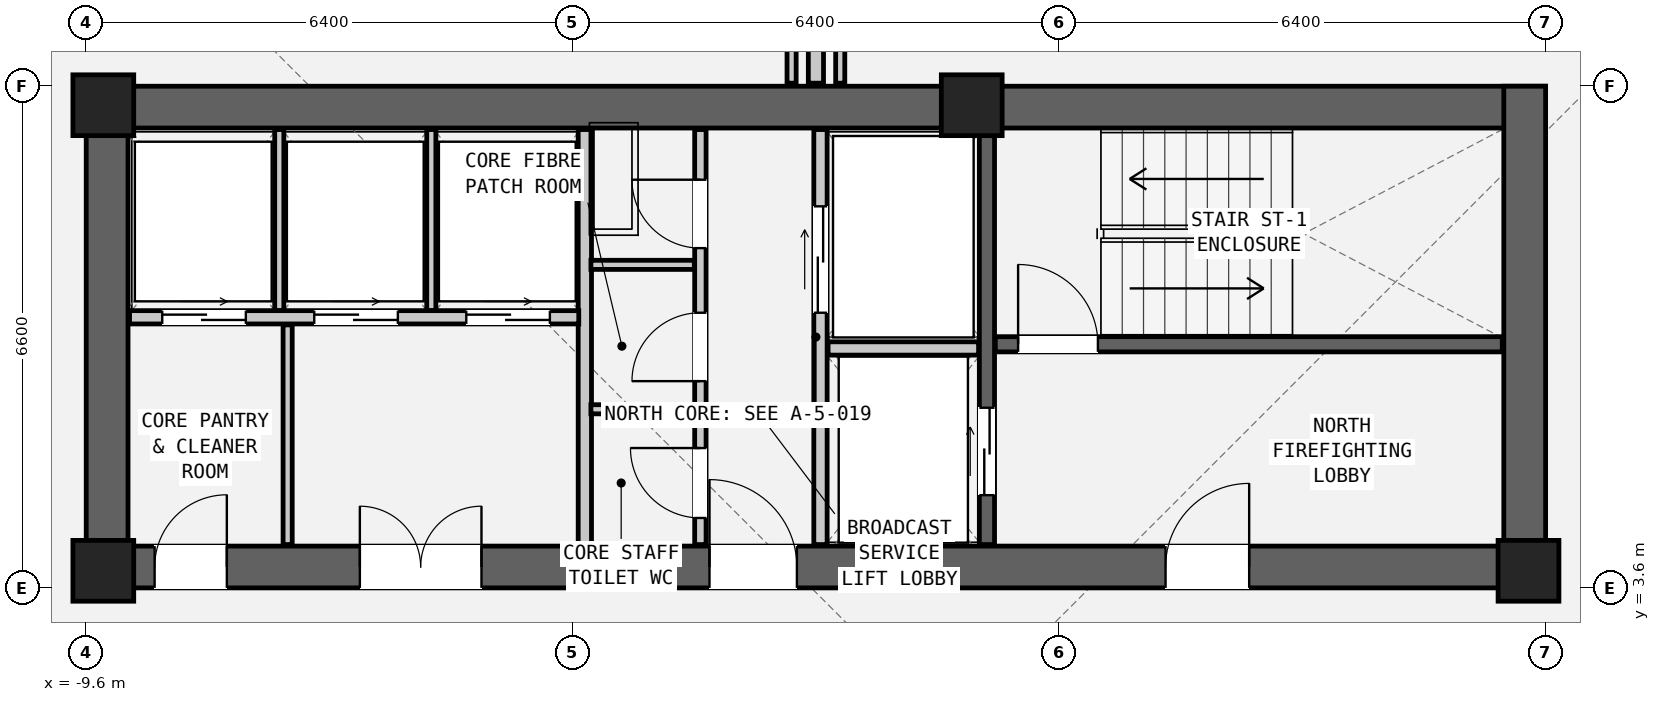
"""IFC4 building model, lengths in metres.
Left out: names, types, materials, properties, quantities, classifications, styles, units other than length and angle.
Written with IfcOpenShell. Run it as: python <this file> out.ifc"""

import sys

from ifc_helpers import new_model, si_unit, direction, frame, frame_2d, origin, origin_2d, place, context, subcontext, project, spatial, rectangle, extrude, element, fill, save


model = new_model("IFC4")
c1 = context("Model", 3, precision=1e-05, world=origin(), true_north=direction((0.0, 1.0)))
c2 = subcontext(c1, "Body", "Model", "MODEL_VIEW")
j1 = project(units=[si_unit("LENGTHUNIT", "METRE"), si_unit("PLANEANGLEUNIT", "RADIAN")], contexts=[c1])
p1 = place(None, origin())
s1 = spatial("IfcSite", under=j1, at=p1, CompositionType="ELEMENT")
p2 = place(p1, origin())
s2 = spatial("IfcBuilding", under=s1, at=p2, CompositionType="ELEMENT")
p3 = place(p2, frame((0.0, 0.0, 57.9)))
s3 = spatial("IfcBuildingStorey", under=s2, at=p3, CompositionType="ELEMENT", Elevation=57.9)
p4 = place(p3, frame((-9.6, 9.925, 0.0), z_axis=(0.0, 0.0, 1.0), x_axis=(1.0, 0.0, 0.0)))
e1 = element("IfcWall", 1, at=p4, inside=s3, PredefinedType="SHEAR", context=c2, shape_type="SweptSolid", body=[
    extrude(rectangle(XDim=19.2, YDim=0.55, at=frame_2d((9.6, 0.0))), origin(), (0.0, 0.0, 1.0), 3.6),
])
p5 = place(p3, frame((-9.6, 3.875, 0.0), z_axis=(0.0, 0.0, 1.0), x_axis=(1.0, 0.0, 0.0)))
e2 = element("IfcWall", 2, at=p5, inside=s3, PredefinedType="SHEAR", context=c2, shape_type="SweptSolid", body=[
    extrude(rectangle(XDim=19.2, YDim=0.55, at=frame_2d((9.6, 0.0))), origin(), (0.0, 0.0, 1.0), 3.6),
])
p6 = place(p5, frame((14.2, 0.0, 0.0)))
e3 = element("IfcOpeningElement", 3, at=p6, cuts=e2, PredefinedType="OPENING", context=c2, shape_type="SweptSolid", body=[
    extrude(rectangle(XDim=1.1, YDim=2.08, at=frame_2d((0.55, 1.04))), frame((0.0, 0.287, 0.0), z_axis=(0.0, -1.0, 0.0), x_axis=(1.0, 0.0, 0.0)), (0.0, 0.0, 1.0), 0.574),
])
p7 = place(p5, frame((8.2, 0.0, 0.0)))
e4 = element("IfcOpeningElement", 4, at=p7, cuts=e2, PredefinedType="OPENING", context=c2, shape_type="SweptSolid", body=[
    extrude(rectangle(XDim=1.15, YDim=2.1, at=frame_2d((0.575, 1.05))), frame((0.0, 0.287, 0.0), z_axis=(0.0, -1.0, 0.0), x_axis=(1.0, 0.0, 0.0)), (0.0, 0.0, 1.0), 0.574),
])
p8 = place(p5, frame((0.9, 0.0, 0.0)))
e5 = element("IfcOpeningElement", 5, at=p8, cuts=e2, PredefinedType="OPENING", context=c2, shape_type="SweptSolid", body=[
    extrude(rectangle(XDim=0.95, YDim=2.1, at=frame_2d((0.475, 1.05))), frame((0.0, 0.287, 0.0), z_axis=(0.0, -1.0, 0.0), x_axis=(1.0, 0.0, 0.0)), (0.0, 0.0, 1.0), 0.574),
])
p9 = place(p5, frame((3.6, 0.0, 0.0)))
e6 = element("IfcOpeningElement", 6, at=p9, cuts=e2, PredefinedType="OPENING", context=c2, shape_type="SweptSolid", body=[
    extrude(rectangle(XDim=1.6, YDim=2.12, at=frame_2d((0.8, 1.06))), frame((0.0, 0.287, 0.0), z_axis=(0.0, -1.0, 0.0), x_axis=(1.0, 0.0, 0.0)), (0.0, 0.0, 1.0), 0.574),
])
for number, where, z_axis, x_axis in (
    (7, (-9.325, 3.6, 0.0), (0.0, 0.0, 1.0), (0.0, 1.0, 0.0)),
    (8, (9.325, 3.6, 0.0), (0.0, 0.0, 1.0), (0.0, 1.0, 0.0)),
):
    element("IfcWall", number, at=place(p3, frame(where, z_axis=z_axis, x_axis=x_axis)), inside=s3, PredefinedType="SHEAR", context=c2, shape_type="SweptSolid", body=[
        extrude(rectangle(XDim=6.6, YDim=0.55, at=frame_2d((3.3, 0.0))), origin(), (0.0, 0.0, 1.0), 3.6),
    ])
for number, where, z_axis, x_axis in (
    (9, (-9.375, 9.95, 0.0), (0.0, 0.0, 1.0), (1.0, 0.0, 0.0)),
    (10, (2.05, 9.95, 0.0), (0.0, 0.0, 1.0), (1.0, 0.0, 0.0)),
    (11, (-9.375, 3.825, 0.0), (0.0, 0.0, 1.0), (1.0, 0.0, 0.0)),
    (12, (9.375, 3.825, 0.0), (0.0, 0.0, 1.0), (1.0, 0.0, 0.0)),
):
    element("IfcColumn", number, at=place(p3, frame(where, z_axis=z_axis, x_axis=x_axis)), inside=s3, PredefinedType="COLUMN", context=c2, shape_type="SweptSolid", body=[
        extrude(rectangle(XDim=0.8, YDim=0.8, at=origin_2d()), origin(), (0.0, 0.0, 1.0), 3.6),
    ])
p10 = place(p3, frame((2.36, 6.805, 0.0), z_axis=(0.0, 0.0, 1.0), x_axis=(1.0, 0.0, 0.0)))
e13 = element("IfcWall", 13, at=p10, inside=s3, PredefinedType="SHEAR", context=c2, shape_type="SweptSolid", body=[
    extrude(rectangle(XDim=6.67, YDim=0.2, at=frame_2d((3.335, 0.0))), origin(), (0.0, 0.0, 1.0), 3.38),
])
p11 = place(p10, frame((0.3, 0.0, 0.0)))
e14 = element("IfcOpeningElement", 14, at=p11, cuts=e13, PredefinedType="OPENING", context=c2, shape_type="SweptSolid", body=[
    extrude(rectangle(XDim=1.05, YDim=2.08, at=frame_2d((0.525, 1.04))), frame((0.0, 0.112, 0.0), z_axis=(0.0, -1.0, 0.0), x_axis=(1.0, 0.0, 0.0)), (0.0, 0.0, 1.0), 0.224),
])
p12 = place(p3, frame((2.25, 4.17, 0.0), z_axis=(0.0, 0.0, 1.0), x_axis=(0.0, 1.0, 0.0)))
e15 = element("IfcWall", 15, at=p12, inside=s3, PredefinedType="SHEAR", context=c2, shape_type="SweptSolid", body=[
    extrude(rectangle(XDim=5.46, YDim=0.2, at=frame_2d((2.73, 0.0))), origin(), (0.0, 0.0, 1.0), 3.38),
])
p13 = place(p12, frame((0.65, 0.0, 0.0)))
e16 = element("IfcOpeningElement", 16, at=p13, cuts=e15, PredefinedType="OPENING", context=c2, shape_type="SweptSolid", body=[
    extrude(rectangle(XDim=1.15, YDim=2.08, at=frame_2d((0.575, 1.04))), frame((0.0, 0.112, 0.0), z_axis=(0.0, -1.0, 0.0), x_axis=(1.0, 0.0, 0.0)), (0.0, 0.0, 1.0), 0.224),
])
p14 = place(p3, frame((0.06, 4.17, 0.0), z_axis=(0.0, 0.0, 1.0), x_axis=(0.0, 1.0, 0.0)))
e17 = element("IfcWall", 17, at=p14, inside=s3, PredefinedType="PARTITIONING", context=c2, shape_type="SweptSolid", body=[
    extrude(rectangle(XDim=5.46, YDim=0.175, at=frame_2d((2.73, 0.0))), origin(), (0.0, 0.0, 1.0), 3.38),
])
p15 = place(p14, frame((3.05, 0.0, 0.0)))
e18 = element("IfcOpeningElement", 18, at=p15, cuts=e17, PredefinedType="OPENING", context=c2, shape_type="SweptSolid", body=[
    extrude(rectangle(XDim=1.4, YDim=2.12, at=frame_2d((0.7, 1.06))), frame((0.0, 0.1, 0.0), z_axis=(0.0, -1.0, 0.0), x_axis=(1.0, 0.0, 0.0)), (0.0, 0.0, 1.0), 0.199),
])
p16 = place(p3, frame((0.16, 6.75, 0.0), z_axis=(0.0, 0.0, 1.0), x_axis=(1.0, 0.0, 0.0)))
e19 = element("IfcWall", 19, at=p16, inside=s3, PredefinedType="PARTITIONING", context=c2, shape_type="SweptSolid", body=[
    extrude(rectangle(XDim=1.98, YDim=0.175, at=frame_2d((0.99, 0.0))), origin(), (0.0, 0.0, 1.0), 3.38),
])
p17 = place(p3, frame((-3.04, 4.17, 0.0), z_axis=(0.0, 0.0, 1.0), x_axis=(0.0, 1.0, 0.0)))
e20 = element("IfcWall", 20, at=p17, inside=s3, PredefinedType="PARTITIONING", context=c2, shape_type="SweptSolid", body=[
    extrude(rectangle(XDim=5.46, YDim=0.175, at=frame_2d((2.73, 0.0))), origin(), (0.0, 0.0, 1.0), 3.38),
])
p18 = place(p3, frame((-1.52, 4.17, 0.0), z_axis=(0.0, 0.0, 1.0), x_axis=(0.0, 1.0, 0.0)))
e21 = element("IfcWall", 21, at=p18, inside=s3, PredefinedType="PARTITIONING", context=c2, shape_type="SweptSolid", body=[
    extrude(rectangle(XDim=5.46, YDim=0.15, at=frame_2d((2.73, 0.0))), origin(), (0.0, 0.0, 1.0), 3.38),
])
p19 = place(p18, frame((3.9, 0.0, 0.0)))
e22 = element("IfcOpeningElement", 22, at=p19, cuts=e21, PredefinedType="OPENING", context=c2, shape_type="SweptSolid", body=[
    extrude(rectangle(XDim=0.9, YDim=2.05, at=frame_2d((0.45, 1.025))), frame((0.0, 0.087, 0.0), z_axis=(0.0, -1.0, 0.0), x_axis=(1.0, 0.0, 0.0)), (0.0, 0.0, 1.0), 0.174),
])
p20 = place(p18, frame((2.15, 0.0, 0.0)))
e23 = element("IfcOpeningElement", 23, at=p20, cuts=e21, PredefinedType="OPENING", context=c2, shape_type="SweptSolid", body=[
    extrude(rectangle(XDim=0.9, YDim=2.05, at=frame_2d((0.45, 1.025))), frame((0.0, 0.087, 0.0), z_axis=(0.0, -1.0, 0.0), x_axis=(1.0, 0.0, 0.0)), (0.0, 0.0, 1.0), 0.174),
])
p21 = place(p18, frame((0.35, 0.0, 0.0)))
e24 = element("IfcOpeningElement", 24, at=p21, cuts=e21, PredefinedType="OPENING", context=c2, shape_type="SweptSolid", body=[
    extrude(rectangle(XDim=0.92, YDim=2.1, at=frame_2d((0.46, 1.05))), frame((0.0, 0.087, 0.0), z_axis=(0.0, -1.0, 0.0), x_axis=(1.0, 0.0, 0.0)), (0.0, 0.0, 1.0), 0.174),
])
for number, where, z_axis, x_axis in (
    (25, (-2.96, 5.95, 0.0), (0.0, 0.0, 1.0), (1.0, 0.0, 0.0)),
    (26, (-2.96, 7.85, 0.0), (0.0, 0.0, 1.0), (1.0, 0.0, 0.0)),
):
    element("IfcWall", number, at=place(p3, frame(where, z_axis=z_axis, x_axis=x_axis)), inside=s3, PredefinedType="PARTITIONING", context=c2, shape_type="SweptSolid", body=[
        extrude(rectangle(XDim=1.36, YDim=0.12, at=frame_2d((0.68, 0.0))), origin(), (0.0, 0.0, 1.0), 3.38),
    ])
p22 = place(p3, frame((-9.03, 7.16, 0.0), z_axis=(0.0, 0.0, 1.0), x_axis=(1.0, 0.0, 0.0)))
e27 = element("IfcWall", 27, at=p22, inside=s3, PredefinedType="PARTITIONING", context=c2, shape_type="SweptSolid", body=[
    extrude(rectangle(XDim=5.91, YDim=0.175, at=frame_2d((2.955, 0.0))), origin(), (0.0, 0.0, 1.0), 3.38),
])
p23 = place(p22, frame((0.43, 0.0, 0.0)))
e28 = element("IfcOpeningElement", 28, at=p23, cuts=e27, PredefinedType="OPENING", context=c2, shape_type="SweptSolid", body=[
    extrude(rectangle(XDim=1.1, YDim=2.06, at=frame_2d((0.55, 1.03))), frame((0.0, 0.1, 0.0), z_axis=(0.0, -1.0, 0.0), x_axis=(1.0, 0.0, 0.0)), (0.0, 0.0, 1.0), 0.199),
])
p24 = place(p22, frame((2.43, 0.0, 0.0)))
e29 = element("IfcOpeningElement", 29, at=p24, cuts=e27, PredefinedType="OPENING", context=c2, shape_type="SweptSolid", body=[
    extrude(rectangle(XDim=1.1, YDim=2.06, at=frame_2d((0.55, 1.03))), frame((0.0, 0.1, 0.0), z_axis=(0.0, -1.0, 0.0), x_axis=(1.0, 0.0, 0.0)), (0.0, 0.0, 1.0), 0.199),
])
p25 = place(p22, frame((4.43, 0.0, 0.0)))
e30 = element("IfcOpeningElement", 30, at=p25, cuts=e27, PredefinedType="OPENING", context=c2, shape_type="SweptSolid", body=[
    extrude(rectangle(XDim=1.1, YDim=2.06, at=frame_2d((0.55, 1.03))), frame((0.0, 0.1, 0.0), z_axis=(0.0, -1.0, 0.0), x_axis=(1.0, 0.0, 0.0)), (0.0, 0.0, 1.0), 0.199),
])
for number, where, z_axis, x_axis in (
    (31, (-7.06, 7.25, 0.0), (0.0, 0.0, 1.0), (0.0, 1.0, 0.0)),
    (32, (-5.06, 7.25, 0.0), (0.0, 0.0, 1.0), (0.0, 1.0, 0.0)),
):
    element("IfcWall", number, at=place(p3, frame(where, z_axis=z_axis, x_axis=x_axis)), inside=s3, PredefinedType="PARTITIONING", context=c2, shape_type="SweptSolid", body=[
        extrude(rectangle(XDim=2.38, YDim=0.12, at=frame_2d((1.19, 0.0))), origin(), (0.0, 0.0, 1.0), 3.38),
    ])
p26 = place(p3, frame((-6.95, 4.17, 0.0), z_axis=(0.0, 0.0, 1.0), x_axis=(0.0, 1.0, 0.0)))
e33 = element("IfcWall", 33, at=p26, inside=s3, PredefinedType="PARTITIONING", context=c2, shape_type="SweptSolid", body=[
    extrude(rectangle(XDim=2.89, YDim=0.12, at=frame_2d((1.445, 0.0))), origin(), (0.0, 0.0, 1.0), 3.38),
])
p27 = place(p3, frame((0.0, 10.24, 0.0), z_axis=(0.0, 0.0, 1.0), x_axis=(0.0, 1.0, 0.0)))
e34 = element("IfcWall", 34, at=p27, inside=s3, PredefinedType="PARTITIONING", context=c2, shape_type="SweptSolid", body=[
    extrude(rectangle(XDim=12.81, YDim=0.2, at=frame_2d((6.405, 0.0))), origin(), (0.0, 0.0, 1.0), 2.901),
])
for number, where, z_axis, x_axis in (
    (35, (-0.32, 10.24, 0.0), (0.0, 0.0, 1.0), (0.0, 1.0, 0.0)),
    (36, (0.32, 10.24, 0.0), (0.0, 0.0, 1.0), (0.0, 1.0, 0.0)),
):
    element("IfcWall", number, at=place(p3, frame(where, z_axis=z_axis, x_axis=x_axis)), inside=s3, PredefinedType="PARTITIONING", context=c2, shape_type="SweptSolid", body=[
        extrude(rectangle(XDim=2.36, YDim=0.12, at=frame_2d((1.18, 0.0))), origin(), (0.0, 0.0, 1.0), 2.901),
    ])
p28 = place(p11, origin())
e37 = element("IfcDoor", 37, at=p28, inside=s3, OperationType="SINGLE_SWING_LEFT", PredefinedType="DOOR", context=c2, shape_type="SweptSolid", body=[
    extrude(rectangle(XDim=1.05, YDim=2.08, at=frame_2d((0.525, 1.04))), frame((0.0, 0.025, 0.0), z_axis=(0.0, -1.0, 0.0), x_axis=(1.0, 0.0, 0.0)), (0.0, 0.0, 1.0), 0.05),
])
fill(e14, e37)
p29 = place(p6, origin())
e38 = element("IfcDoor", 38, at=p29, inside=s3, OperationType="SINGLE_SWING_RIGHT", PredefinedType="DOOR", context=c2, shape_type="SweptSolid", body=[
    extrude(rectangle(XDim=1.1, YDim=2.08, at=frame_2d((0.55, 1.04))), frame((0.0, 0.025, 0.0), z_axis=(0.0, -1.0, 0.0), x_axis=(1.0, 0.0, 0.0)), (0.0, 0.0, 1.0), 0.05),
])
fill(e3, e38)
p30 = place(p13, origin())
e39 = element("IfcDoor", 39, at=p30, inside=s3, OperationType="DOUBLE_DOOR_SLIDING", PredefinedType="DOOR", context=c2, shape_type="SweptSolid", body=[
    extrude(rectangle(XDim=1.15, YDim=2.08, at=frame_2d((0.575, 1.04))), frame((0.0, 0.025, 0.0), z_axis=(0.0, -1.0, 0.0), x_axis=(1.0, 0.0, 0.0)), (0.0, 0.0, 1.0), 0.05),
])
fill(e16, e39)
p31 = place(p15, origin())
e40 = element("IfcDoor", 40, at=p31, inside=s3, OperationType="DOUBLE_DOOR_SLIDING", PredefinedType="DOOR", context=c2, shape_type="SweptSolid", body=[
    extrude(rectangle(XDim=1.4, YDim=2.12, at=frame_2d((0.7, 1.06))), frame((0.0, 0.025, 0.0), z_axis=(0.0, -1.0, 0.0), x_axis=(1.0, 0.0, 0.0)), (0.0, 0.0, 1.0), 0.05),
])
fill(e18, e40)
p32 = place(p7, origin())
e41 = element("IfcDoor", 41, at=p32, inside=s3, OperationType="SINGLE_SWING_LEFT", PredefinedType="DOOR", context=c2, shape_type="SweptSolid", body=[
    extrude(rectangle(XDim=1.15, YDim=2.1, at=frame_2d((0.575, 1.05))), frame((0.0, 0.025, 0.0), z_axis=(0.0, -1.0, 0.0), x_axis=(1.0, 0.0, 0.0)), (0.0, 0.0, 1.0), 0.05),
])
fill(e4, e41)
p33 = place(p19, origin())
e42 = element("IfcDoor", 42, at=p33, inside=s3, OperationType="SINGLE_SWING_RIGHT", PredefinedType="DOOR", context=c2, shape_type="SweptSolid", body=[
    extrude(rectangle(XDim=0.9, YDim=2.05, at=frame_2d((0.45, 1.025))), frame((0.0, 0.025, 0.0), z_axis=(0.0, -1.0, 0.0), x_axis=(1.0, 0.0, 0.0)), (0.0, 0.0, 1.0), 0.05),
])
fill(e22, e42)
p34 = place(p20, origin())
e43 = element("IfcDoor", 43, at=p34, inside=s3, OperationType="SINGLE_SWING_LEFT", PredefinedType="DOOR", context=c2, shape_type="SweptSolid", body=[
    extrude(rectangle(XDim=0.9, YDim=2.05, at=frame_2d((0.45, 1.025))), frame((0.0, 0.025, 0.0), z_axis=(0.0, -1.0, 0.0), x_axis=(1.0, 0.0, 0.0)), (0.0, 0.0, 1.0), 0.05),
])
fill(e23, e43)
p35 = place(p21, origin())
e44 = element("IfcDoor", 44, at=p35, inside=s3, OperationType="SINGLE_SWING_RIGHT", PredefinedType="DOOR", context=c2, shape_type="SweptSolid", body=[
    extrude(rectangle(XDim=0.92, YDim=2.1, at=frame_2d((0.46, 1.05))), frame((0.0, 0.025, 0.0), z_axis=(0.0, -1.0, 0.0), x_axis=(1.0, 0.0, 0.0)), (0.0, 0.0, 1.0), 0.05),
])
fill(e24, e44)
p36 = place(p23, origin())
e45 = element("IfcDoor", 45, at=p36, inside=s3, OperationType="DOUBLE_DOOR_SLIDING", PredefinedType="DOOR", context=c2, shape_type="SweptSolid", body=[
    extrude(rectangle(XDim=1.1, YDim=2.06, at=frame_2d((0.55, 1.03))), frame((0.0, 0.025, 0.0), z_axis=(0.0, -1.0, 0.0), x_axis=(1.0, 0.0, 0.0)), (0.0, 0.0, 1.0), 0.05),
])
fill(e28, e45)
p37 = place(p24, origin())
e46 = element("IfcDoor", 46, at=p37, inside=s3, OperationType="DOUBLE_DOOR_SLIDING", PredefinedType="DOOR", context=c2, shape_type="SweptSolid", body=[
    extrude(rectangle(XDim=1.1, YDim=2.06, at=frame_2d((0.55, 1.03))), frame((0.0, 0.025, 0.0), z_axis=(0.0, -1.0, 0.0), x_axis=(1.0, 0.0, 0.0)), (0.0, 0.0, 1.0), 0.05),
])
fill(e29, e46)
p38 = place(p25, origin())
e47 = element("IfcDoor", 47, at=p38, inside=s3, OperationType="DOUBLE_DOOR_SLIDING", PredefinedType="DOOR", context=c2, shape_type="SweptSolid", body=[
    extrude(rectangle(XDim=1.1, YDim=2.06, at=frame_2d((0.55, 1.03))), frame((0.0, 0.025, 0.0), z_axis=(0.0, -1.0, 0.0), x_axis=(1.0, 0.0, 0.0)), (0.0, 0.0, 1.0), 0.05),
])
fill(e30, e47)
p39 = place(p8, origin())
e48 = element("IfcDoor", 48, at=p39, inside=s3, OperationType="SINGLE_SWING_RIGHT", PredefinedType="DOOR", context=c2, shape_type="SweptSolid", body=[
    extrude(rectangle(XDim=0.95, YDim=2.1, at=frame_2d((0.475, 1.05))), frame((0.0, 0.025, 0.0), z_axis=(0.0, -1.0, 0.0), x_axis=(1.0, 0.0, 0.0)), (0.0, 0.0, 1.0), 0.05),
])
fill(e5, e48)
p40 = place(p9, origin())
e49 = element("IfcDoor", 49, at=p40, inside=s3, OperationType="DOUBLE_DOOR_SINGLE_SWING", PredefinedType="DOOR", context=c2, shape_type="SweptSolid", body=[
    extrude(rectangle(XDim=1.6, YDim=2.12, at=frame_2d((0.8, 1.06))), frame((0.0, 0.025, 0.0), z_axis=(0.0, -1.0, 0.0), x_axis=(1.0, 0.0, 0.0)), (0.0, 0.0, 1.0), 0.05),
])
fill(e6, e49)
save(model, sys.argv[1])
